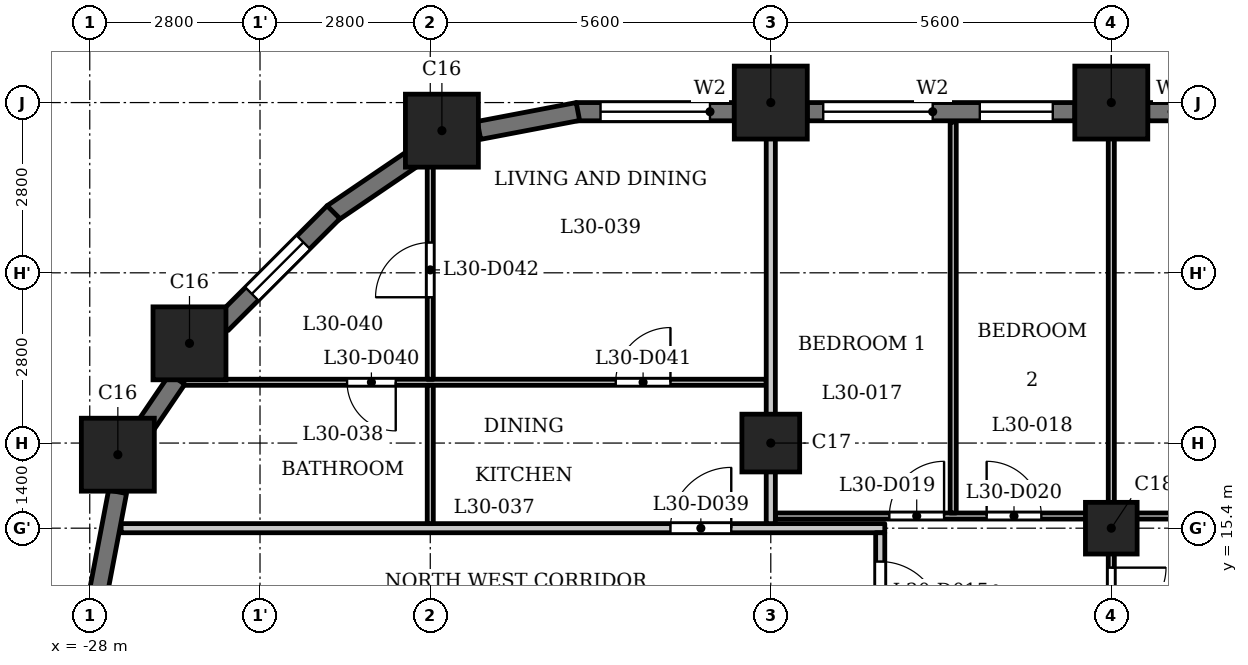
"""IFC4 building model, lengths in metres.
Left out: names, types, materials, properties, quantities, classifications, styles, units other than length and angle.
Written with IfcOpenShell. Run it as: python <this file> out.ifc"""

import sys

from ifc_helpers import new_model, si_unit, direction, frame, frame_2d, origin, origin_2d, place, context, subcontext, project, spatial, rectangle, extrude, element, fill, save


model = new_model("IFC4")
c1 = context("Model", 3, precision=1e-05, world=origin(), true_north=direction((0.0, 1.0)))
c2 = subcontext(c1, "Body", "Model", "MODEL_VIEW")
j1 = project(units=[si_unit("LENGTHUNIT", "METRE"), si_unit("PLANEANGLEUNIT", "RADIAN")], contexts=[c1])
p1 = place(None, origin())
s1 = spatial("IfcSite", under=j1, at=p1, CompositionType="ELEMENT")
p2 = place(p1, origin())
s2 = spatial("IfcBuilding", under=s1, at=p2, CompositionType="ELEMENT")
p3 = place(p2, frame((0.0, 0.0, 118.3)))
s3 = spatial("IfcBuildingStorey", under=s2, at=p3, CompositionType="ELEMENT", Elevation=118.3)
for number, where, z_axis, x_axis in (
    (1, (-11.2, 22.4, 0.0), (0.0, 0.0, 1.0), (1.0, 0.0, 0.0)),
    (2, (-16.8, 22.4, 0.0), (0.0, 0.0, 1.0), (1.0, 0.0, 0.0)),
    (3, (-22.209, 21.938, 0.0), (0.0, 0.0, 1.0), (1.0, 0.0, 0.0)),
    (4, (-26.36, 18.44, 0.0), (0.0, 0.0, 1.0), (1.0, 0.0, 0.0)),
    (5, (-27.538, 16.609, 0.0), (0.0, 0.0, 1.0), (1.0, 0.0, 0.0)),
):
    element("IfcColumn", number, at=place(p3, frame(where, z_axis=z_axis, x_axis=x_axis)), inside=s3, PredefinedType="COLUMN", context=c2, shape_type="SweptSolid", body=[
        extrude(rectangle(XDim=1.2, YDim=1.2, at=origin_2d()), origin(), (0.0, 0.0, 1.0), 3.5),
    ])
p4 = place(p3, frame((-16.8, 16.8, 0.0), z_axis=(0.0, 0.0, 1.0), x_axis=(1.0, 0.0, 0.0)))
e6 = element("IfcColumn", 6, at=p4, inside=s3, PredefinedType="COLUMN", context=c2, shape_type="SweptSolid", body=[
    extrude(rectangle(XDim=0.95, YDim=0.95, at=origin_2d()), origin(), (0.0, 0.0, 1.0), 3.5),
])
p5 = place(p3, frame((-11.2, 15.4, 0.0), z_axis=(0.0, 0.0, 1.0), x_axis=(1.0, 0.0, 0.0)))
e7 = element("IfcColumn", 7, at=p5, inside=s3, PredefinedType="COLUMN", context=c2, shape_type="SweptSolid", body=[
    extrude(rectangle(XDim=0.85, YDim=0.85, at=origin_2d()), origin(), (0.0, 0.0, 1.0), 3.5),
])
p6 = place(p3, frame((-6.2, 22.25, 0.0), z_axis=(0.0, 0.0, 1.0), x_axis=(-1.0, 0.0, 0.0)))
e8 = element("IfcWall", 8, at=p6, inside=s3, PredefinedType="SOLIDWALL", context=c2, shape_type="SweptSolid", body=[
    extrude(rectangle(XDim=4.4, YDim=0.3, at=frame_2d((2.2, 0.0))), origin(), (0.0, 0.0, 1.0), 2.4),
])
p7 = place(p6, frame((0.4, 0.0, 1.2)))
e9 = element("IfcOpeningElement", 9, at=p7, cuts=e8, PredefinedType="OPENING", context=c2, shape_type="SweptSolid", body=[
    extrude(rectangle(XDim=3.6, YDim=0.95, at=frame_2d((1.8, 0.475))), frame((0.0, 0.16, 0.0), z_axis=(0.0, -1.0, 0.0), x_axis=(1.0, 0.0, 0.0)), (0.0, 0.0, 1.0), 0.32),
])
p8 = place(p3, frame((-11.8, 22.25, 0.0), z_axis=(0.0, 0.0, 1.0), x_axis=(-1.0, 0.0, 0.0)))
e10 = element("IfcWall", 10, at=p8, inside=s3, PredefinedType="SOLIDWALL", context=c2, shape_type="SweptSolid", body=[
    extrude(rectangle(XDim=4.4, YDim=0.3, at=frame_2d((2.2, 0.0))), origin(), (0.0, 0.0, 1.0), 2.4),
])
p9 = place(p8, frame((0.363, 0.0, 0.6)))
e11 = element("IfcOpeningElement", 11, at=p9, cuts=e10, PredefinedType="OPENING", context=c2, shape_type="SweptSolid", body=[
    extrude(rectangle(XDim=1.2, YDim=1.55, at=frame_2d((0.6, 0.775))), frame((0.0, 0.16, 0.0), z_axis=(0.0, -1.0, 0.0), x_axis=(1.0, 0.0, 0.0)), (0.0, 0.0, 1.0), 0.32),
])
p10 = place(p8, frame((2.337, 0.0, 0.9)))
e12 = element("IfcOpeningElement", 12, at=p10, cuts=e10, PredefinedType="OPENING", context=c2, shape_type="SweptSolid", body=[
    extrude(rectangle(XDim=1.8, YDim=1.25, at=frame_2d((0.9, 0.625))), frame((0.0, 0.16, 0.0), z_axis=(0.0, -1.0, 0.0), x_axis=(1.0, 0.0, 0.0)), (0.0, 0.0, 1.0), 0.32),
])
p11 = place(p3, frame((-17.4, 22.25, 0.0), z_axis=(0.0, 0.0, 1.0), x_axis=(-1.0, 0.0, 0.0)))
e13 = element("IfcWall", 13, at=p11, inside=s3, PredefinedType="SOLIDWALL", context=c2, shape_type="SweptSolid", body=[
    extrude(rectangle(XDim=2.6, YDim=0.3, at=frame_2d((1.3, 0.0))), origin(), (0.0, 0.0, 1.0), 2.4),
])
p12 = place(p11, frame((0.4, 0.0, 0.9)))
e14 = element("IfcOpeningElement", 14, at=p12, cuts=e13, PredefinedType="OPENING", context=c2, shape_type="SweptSolid", body=[
    extrude(rectangle(XDim=1.8, YDim=1.25, at=frame_2d((0.9, 0.625))), frame((0.0, 0.16, 0.0), z_axis=(0.0, -1.0, 0.0), x_axis=(1.0, 0.0, 0.0)), (0.0, 0.0, 1.0), 0.32),
])
for number, where, z_axis, x_axis in (
    (15, (-19.972, 22.253, 0.0), (0.0, 0.0, 1.0), (-0.982, -0.187, 0.0)),
    (16, (-22.643, 21.51, 0.0), (0.0, 0.0, 1.0), (-0.827, -0.562, 0.0)),
):
    element("IfcWall", number, at=place(p3, frame(where, z_axis=z_axis, x_axis=x_axis)), inside=s3, PredefinedType="SOLIDWALL", context=c2, shape_type="SweptSolid", body=[
        extrude(rectangle(XDim=1.656, YDim=0.3, at=frame_2d((0.828, 0.0))), origin(), (0.0, 0.0, 1.0), 2.4),
    ])
p13 = place(p3, frame((-23.991, 20.597, 0.0), z_axis=(0.0, 0.0, 1.0), x_axis=(-0.707106781187, -0.707106781187, 0.0)))
e17 = element("IfcWall", 17, at=p13, inside=s3, PredefinedType="SOLIDWALL", context=c2, shape_type="SweptSolid", body=[
    extrude(rectangle(XDim=2.6, YDim=0.3, at=frame_2d((1.3, 0.0))), origin(), (0.0, 0.0, 1.0), 2.4),
])
p14 = place(p13, frame((0.7, 0.0, 0.6)))
e18 = element("IfcOpeningElement", 18, at=p14, cuts=e17, PredefinedType="OPENING", context=c2, shape_type="SweptSolid", body=[
    extrude(rectangle(XDim=1.2, YDim=1.55, at=frame_2d((0.6, 0.775))), frame((0.0, 0.16, 0.0), z_axis=(0.0, -1.0, 0.0), x_axis=(1.0, 0.0, 0.0)), (0.0, 0.0, 1.0), 0.32),
])
p15 = place(p3, frame((-26.561, 17.851, 0.0), z_axis=(0.0, 0.0, 1.0), x_axis=(-0.562173331661, -0.827019434577, 0.0)))
e19 = element("IfcWall", 19, at=p15, inside=s3, PredefinedType="SOLIDWALL", context=c2, shape_type="SweptSolid", body=[
    extrude(rectangle(XDim=0.977, YDim=0.3, at=frame_2d((0.489, 0.0))), origin(), (0.0, 0.0, 1.0), 3.2),
])
p16 = place(p3, frame((-27.542, 15.999, 0.0), z_axis=(0.0, 0.0, 1.0), x_axis=(-0.187349172861, -0.982293381546, 0.0)))
e20 = element("IfcWall", 20, at=p16, inside=s3, PredefinedType="SOLIDWALL", context=c2, shape_type="SweptSolid", body=[
    extrude(rectangle(XDim=1.656, YDim=0.3, at=frame_2d((0.828, 0.0))), origin(), (0.0, 0.0, 1.0), 2.4),
])
p17 = place(p3, frame((-27.484, 15.4, 0.0), z_axis=(0.0, 0.0, 1.0), x_axis=(1.0, 0.0, 0.0)))
e21 = element("IfcWall", 21, at=p17, inside=s3, PredefinedType="PARTITIONING", context=c2, shape_type="SweptSolid", body=[
    extrude(rectangle(XDim=12.559, YDim=0.15, at=frame_2d((6.279, 0.0))), origin(), (0.0, 0.0, 1.0), 3.2),
])
p18 = place(p17, frame((9.034, 0.0, 0.0)))
e22 = element("IfcOpeningElement", 22, at=p18, cuts=e21, PredefinedType="OPENING", context=c2, shape_type="SweptSolid", body=[
    extrude(rectangle(XDim=1.0, YDim=2.1, at=frame_2d((0.5, 1.05))), frame((0.0, 0.085, 0.0), z_axis=(0.0, -1.0, 0.0), x_axis=(1.0, 0.0, 0.0)), (0.0, 0.0, 1.0), 0.17),
])
p19 = place(p3, frame((-16.725, 15.6, 0.0), z_axis=(0.0, 0.0, 1.0), x_axis=(1.0, 0.0, 0.0)))
e23 = element("IfcWall", 23, at=p19, inside=s3, PredefinedType="PARTITIONING", context=c2, shape_type="SweptSolid", body=[
    extrude(rectangle(XDim=33.45, YDim=0.1, at=frame_2d((16.725, 0.0))), origin(), (0.0, 0.0, 1.0), 3.2),
])
p20 = place(p19, frame((9.425, 0.0, 0.0)))
e24 = element("IfcOpeningElement", 24, at=p20, cuts=e23, PredefinedType="OPENING", context=c2, shape_type="SweptSolid", body=[
    extrude(rectangle(XDim=0.8, YDim=2.1, at=frame_2d((0.4, 1.05))), frame((0.0, 0.06, 0.0), z_axis=(0.0, -1.0, 0.0), x_axis=(1.0, 0.0, 0.0)), (0.0, 0.0, 1.0), 0.12),
])
p21 = place(p19, frame((6.975, 0.0, 0.0)))
e25 = element("IfcOpeningElement", 25, at=p21, cuts=e23, PredefinedType="OPENING", context=c2, shape_type="SweptSolid", body=[
    extrude(rectangle(XDim=0.9, YDim=2.1, at=frame_2d((0.45, 1.05))), frame((0.0, 0.06, 0.0), z_axis=(0.0, -1.0, 0.0), x_axis=(1.0, 0.0, 0.0)), (0.0, 0.0, 1.0), 0.12),
])
p22 = place(p19, frame((1.875, 0.0, 0.0)))
e26 = element("IfcOpeningElement", 26, at=p22, cuts=e23, PredefinedType="OPENING", context=c2, shape_type="SweptSolid", body=[
    extrude(rectangle(XDim=0.9, YDim=2.1, at=frame_2d((0.45, 1.05))), frame((0.0, 0.06, 0.0), z_axis=(0.0, -1.0, 0.0), x_axis=(1.0, 0.0, 0.0)), (0.0, 0.0, 1.0), 0.12),
])
p23 = place(p19, frame((3.475, 0.0, 0.0)))
e27 = element("IfcOpeningElement", 27, at=p23, cuts=e23, PredefinedType="OPENING", context=c2, shape_type="SweptSolid", body=[
    extrude(rectangle(XDim=0.9, YDim=2.1, at=frame_2d((0.45, 1.05))), frame((0.0, 0.06, 0.0), z_axis=(0.0, -1.0, 0.0), x_axis=(1.0, 0.0, 0.0)), (0.0, 0.0, 1.0), 0.12),
])
p24 = place(p19, frame((11.775, 0.0, 0.0)))
e28 = element("IfcOpeningElement", 28, at=p24, cuts=e23, PredefinedType="OPENING", context=c2, shape_type="SweptSolid", body=[
    extrude(rectangle(XDim=0.8, YDim=2.1, at=frame_2d((0.4, 1.05))), frame((0.0, 0.06, 0.0), z_axis=(0.0, -1.0, 0.0), x_axis=(1.0, 0.0, 0.0)), (0.0, 0.0, 1.0), 0.12),
])
p25 = place(p19, frame((14.175, 0.0, 0.0)))
e29 = element("IfcOpeningElement", 29, at=p25, cuts=e23, PredefinedType="OPENING", context=c2, shape_type="SweptSolid", body=[
    extrude(rectangle(XDim=0.9, YDim=2.1, at=frame_2d((0.45, 1.05))), frame((0.0, 0.06, 0.0), z_axis=(0.0, -1.0, 0.0), x_axis=(1.0, 0.0, 0.0)), (0.0, 0.0, 1.0), 0.12),
])
p26 = place(p19, frame((20.725, 0.0, 0.0)))
e30 = element("IfcOpeningElement", 30, at=p26, cuts=e23, PredefinedType="OPENING", context=c2, shape_type="SweptSolid", body=[
    extrude(rectangle(XDim=0.8, YDim=2.1, at=frame_2d((0.4, 1.05))), frame((0.0, 0.06, 0.0), z_axis=(0.0, -1.0, 0.0), x_axis=(1.0, 0.0, 0.0)), (0.0, 0.0, 1.0), 0.12),
])
p27 = place(p19, frame((18.375, 0.0, 0.0)))
e31 = element("IfcOpeningElement", 31, at=p27, cuts=e23, PredefinedType="OPENING", context=c2, shape_type="SweptSolid", body=[
    extrude(rectangle(XDim=0.9, YDim=2.1, at=frame_2d((0.45, 1.05))), frame((0.0, 0.06, 0.0), z_axis=(0.0, -1.0, 0.0), x_axis=(1.0, 0.0, 0.0)), (0.0, 0.0, 1.0), 0.12),
])
p28 = place(p19, frame((26.425, 0.0, 0.0)))
e32 = element("IfcOpeningElement", 32, at=p28, cuts=e23, PredefinedType="OPENING", context=c2, shape_type="SweptSolid", body=[
    extrude(rectangle(XDim=0.8, YDim=2.1, at=frame_2d((0.4, 1.05))), frame((0.0, 0.06, 0.0), z_axis=(0.0, -1.0, 0.0), x_axis=(1.0, 0.0, 0.0)), (0.0, 0.0, 1.0), 0.12),
])
p29 = place(p19, frame((23.875, 0.0, 0.0)))
e33 = element("IfcOpeningElement", 33, at=p29, cuts=e23, PredefinedType="OPENING", context=c2, shape_type="SweptSolid", body=[
    extrude(rectangle(XDim=0.9, YDim=2.1, at=frame_2d((0.45, 1.05))), frame((0.0, 0.06, 0.0), z_axis=(0.0, -1.0, 0.0), x_axis=(1.0, 0.0, 0.0)), (0.0, 0.0, 1.0), 0.12),
])
p30 = place(p19, frame((28.575, 0.0, 0.0)))
e34 = element("IfcOpeningElement", 34, at=p30, cuts=e23, PredefinedType="OPENING", context=c2, shape_type="SweptSolid", body=[
    extrude(rectangle(XDim=0.8, YDim=2.1, at=frame_2d((0.4, 1.05))), frame((0.0, 0.06, 0.0), z_axis=(0.0, -1.0, 0.0), x_axis=(1.0, 0.0, 0.0)), (0.0, 0.0, 1.0), 0.12),
])
p31 = place(p19, frame((30.725, 0.0, 0.0)))
e35 = element("IfcOpeningElement", 35, at=p31, cuts=e23, PredefinedType="OPENING", context=c2, shape_type="SweptSolid", body=[
    extrude(rectangle(XDim=0.9, YDim=2.1, at=frame_2d((0.45, 1.05))), frame((0.0, 0.06, 0.0), z_axis=(0.0, -1.0, 0.0), x_axis=(1.0, 0.0, 0.0)), (0.0, 0.0, 1.0), 0.12),
])
p32 = place(p3, frame((-26.465, 17.8, 0.0), z_axis=(0.0, 0.0, 1.0), x_axis=(1.0, 0.0, 0.0)))
e36 = element("IfcWall", 36, at=p32, inside=s3, PredefinedType="PARTITIONING", context=c2, shape_type="SweptSolid", body=[
    extrude(rectangle(XDim=9.59, YDim=0.1, at=frame_2d((4.795, 0.0))), origin(), (0.0, 0.0, 1.0), 3.2),
])
p33 = place(p32, frame((2.697, 0.0, 0.0)))
e37 = element("IfcOpeningElement", 37, at=p33, cuts=e36, PredefinedType="OPENING", context=c2, shape_type="SweptSolid", body=[
    extrude(rectangle(XDim=0.8, YDim=2.1, at=frame_2d((0.4, 1.05))), frame((0.0, 0.06, 0.0), z_axis=(0.0, -1.0, 0.0), x_axis=(1.0, 0.0, 0.0)), (0.0, 0.0, 1.0), 0.12),
])
p34 = place(p32, frame((7.115, 0.0, 0.0)))
e38 = element("IfcOpeningElement", 38, at=p34, cuts=e36, PredefinedType="OPENING", context=c2, shape_type="SweptSolid", body=[
    extrude(rectangle(XDim=0.9, YDim=2.1, at=frame_2d((0.45, 1.05))), frame((0.0, 0.06, 0.0), z_axis=(0.0, -1.0, 0.0), x_axis=(1.0, 0.0, 0.0)), (0.0, 0.0, 1.0), 0.12),
])
p35 = place(p3, frame((-22.4, 15.475, 0.0), z_axis=(0.0, 0.0, 1.0), x_axis=(0.0, 1.0, 0.0)))
e39 = element("IfcWall", 39, at=p35, inside=s3, PredefinedType="PARTITIONING", context=c2, shape_type="SweptSolid", body=[
    extrude(rectangle(XDim=2.275, YDim=0.1, at=frame_2d((1.137, 0.0))), origin(), (0.0, 0.0, 1.0), 3.2),
])
p36 = place(p3, frame((-22.4, 17.85, 0.0), z_axis=(0.0, 0.0, 1.0), x_axis=(0.0, 1.0, 0.0)))
e40 = element("IfcWall", 40, at=p36, inside=s3, PredefinedType="PARTITIONING", context=c2, shape_type="SweptSolid", body=[
    extrude(rectangle(XDim=3.87, YDim=0.1, at=frame_2d((1.935, 0.0))), origin(), (0.0, 0.0, 1.0), 3.2),
])
p37 = place(p36, frame((1.348, 0.0, 0.0)))
e41 = element("IfcOpeningElement", 41, at=p37, cuts=e40, PredefinedType="OPENING", context=c2, shape_type="SweptSolid", body=[
    extrude(rectangle(XDim=0.9, YDim=2.1, at=frame_2d((0.45, 1.05))), frame((0.0, 0.06, 0.0), z_axis=(0.0, -1.0, 0.0), x_axis=(1.0, 0.0, 0.0)), (0.0, 0.0, 1.0), 0.12),
])
p38 = place(p3, frame((-16.8, 15.475, 0.0), z_axis=(0.0, 0.0, 1.0), x_axis=(0.0, 1.0, 0.0)))
e42 = element("IfcWall", 42, at=p38, inside=s3, PredefinedType="PARTITIONING", context=c2, shape_type="SweptSolid", body=[
    extrude(rectangle(XDim=7.505, YDim=0.15, at=frame_2d((3.752, 0.0))), origin(), (0.0, 0.0, 1.0), 3.2),
])
p39 = place(p3, frame((-15.0, 13.275, 0.0), z_axis=(0.0, 0.0, 1.0), x_axis=(0.0, 1.0, 0.0)))
e43 = element("IfcWall", 43, at=p39, inside=s3, PredefinedType="PARTITIONING", context=c2, shape_type="SweptSolid", body=[
    extrude(rectangle(XDim=2.05, YDim=0.15, at=frame_2d((1.025, 0.0))), origin(), (0.0, 0.0, 1.0), 3.2),
])
p40 = place(p39, frame((0.576, 0.0, 0.0)))
e44 = element("IfcOpeningElement", 44, at=p40, cuts=e43, PredefinedType="OPENING", context=c2, shape_type="SweptSolid", body=[
    extrude(rectangle(XDim=1.0, YDim=2.1, at=frame_2d((0.5, 1.05))), frame((0.0, 0.085, 0.0), z_axis=(0.0, -1.0, 0.0), x_axis=(1.0, 0.0, 0.0)), (0.0, 0.0, 1.0), 0.17),
])
p41 = place(p3, frame((-13.8, 15.65, 0.0), z_axis=(0.0, 0.0, 1.0), x_axis=(0.0, 1.0, 0.0)))
e45 = element("IfcWall", 45, at=p41, inside=s3, PredefinedType="PARTITIONING", context=c2, shape_type="SweptSolid", body=[
    extrude(rectangle(XDim=6.43, YDim=0.1, at=frame_2d((3.215, 0.0))), origin(), (0.0, 0.0, 1.0), 3.2),
])
p42 = place(p3, frame((-11.2, 13.275, 0.0), z_axis=(0.0, 0.0, 1.0), x_axis=(0.0, 1.0, 0.0)))
e46 = element("IfcWall", 46, at=p42, inside=s3, PredefinedType="PARTITIONING", context=c2, shape_type="SweptSolid", body=[
    extrude(rectangle(XDim=2.275, YDim=0.1, at=frame_2d((1.138, 0.0))), origin(), (0.0, 0.0, 1.0), 3.2),
])
p43 = place(p42, frame((0.576, 0.0, 0.0)))
e47 = element("IfcOpeningElement", 47, at=p43, cuts=e46, PredefinedType="OPENING", context=c2, shape_type="SweptSolid", body=[
    extrude(rectangle(XDim=0.9, YDim=2.1, at=frame_2d((0.45, 1.05))), frame((0.0, 0.06, 0.0), z_axis=(0.0, -1.0, 0.0), x_axis=(1.0, 0.0, 0.0)), (0.0, 0.0, 1.0), 0.12),
])
p44 = place(p3, frame((-11.2, 15.65, 0.0), z_axis=(0.0, 0.0, 1.0), x_axis=(0.0, 1.0, 0.0)))
e48 = element("IfcWall", 48, at=p44, inside=s3, PredefinedType="PARTITIONING", context=c2, shape_type="SweptSolid", body=[
    extrude(rectangle(XDim=7.33, YDim=0.1, at=frame_2d((3.665, 0.0))), origin(), (0.0, 0.0, 1.0), 3.2),
])
p45 = place(p40, origin())
e49 = element("IfcDoor", 49, at=p45, inside=s3, OperationType="SINGLE_SWING_LEFT", PredefinedType="DOOR", context=c2, shape_type="SweptSolid", body=[
    extrude(rectangle(XDim=1.0, YDim=2.1, at=frame_2d((0.5, 1.05))), frame((0.0, 0.025, 0.0), z_axis=(0.0, -1.0, 0.0), x_axis=(1.0, 0.0, 0.0)), (0.0, 0.0, 1.0), 0.05),
])
fill(e44, e49)
p46 = place(p43, origin())
e50 = element("IfcDoor", 50, at=p46, inside=s3, OperationType="SINGLE_SWING_RIGHT", PredefinedType="DOOR", context=c2, shape_type="SweptSolid", body=[
    extrude(rectangle(XDim=0.9, YDim=2.1, at=frame_2d((0.45, 1.05))), frame((0.0, 0.025, 0.0), z_axis=(0.0, -1.0, 0.0), x_axis=(1.0, 0.0, 0.0)), (0.0, 0.0, 1.0), 0.05),
])
fill(e47, e50)
p47 = place(p22, origin())
e51 = element("IfcDoor", 51, at=p47, inside=s3, OperationType="SINGLE_SWING_LEFT", PredefinedType="DOOR", context=c2, shape_type="SweptSolid", body=[
    extrude(rectangle(XDim=0.9, YDim=2.1, at=frame_2d((0.45, 1.05))), frame((0.0, 0.025, 0.0), z_axis=(0.0, -1.0, 0.0), x_axis=(1.0, 0.0, 0.0)), (0.0, 0.0, 1.0), 0.05),
])
fill(e26, e51)
p48 = place(p23, origin())
e52 = element("IfcDoor", 52, at=p48, inside=s3, OperationType="SINGLE_SWING_RIGHT", PredefinedType="DOOR", context=c2, shape_type="SweptSolid", body=[
    extrude(rectangle(XDim=0.9, YDim=2.1, at=frame_2d((0.45, 1.05))), frame((0.0, 0.025, 0.0), z_axis=(0.0, -1.0, 0.0), x_axis=(1.0, 0.0, 0.0)), (0.0, 0.0, 1.0), 0.05),
])
fill(e27, e52)
p49 = place(p18, origin())
e53 = element("IfcDoor", 53, at=p49, inside=s3, OperationType="SINGLE_SWING_LEFT", PredefinedType="DOOR", context=c2, shape_type="SweptSolid", body=[
    extrude(rectangle(XDim=1.0, YDim=2.1, at=frame_2d((0.5, 1.05))), frame((0.0, 0.025, 0.0), z_axis=(0.0, -1.0, 0.0), x_axis=(1.0, 0.0, 0.0)), (0.0, 0.0, 1.0), 0.05),
])
fill(e22, e53)
p50 = place(p33, origin())
e54 = element("IfcDoor", 54, at=p50, inside=s3, OperationType="SINGLE_SWING_RIGHT", PredefinedType="DOOR", context=c2, shape_type="SweptSolid", body=[
    extrude(rectangle(XDim=0.8, YDim=2.1, at=frame_2d((0.4, 1.05))), frame((0.0, 0.025, 0.0), z_axis=(0.0, -1.0, 0.0), x_axis=(1.0, 0.0, 0.0)), (0.0, 0.0, 1.0), 0.05),
])
fill(e37, e54)
p51 = place(p34, origin())
e55 = element("IfcDoor", 55, at=p51, inside=s3, OperationType="SINGLE_SWING_LEFT", PredefinedType="DOOR", context=c2, shape_type="SweptSolid", body=[
    extrude(rectangle(XDim=0.9, YDim=2.1, at=frame_2d((0.45, 1.05))), frame((0.0, 0.025, 0.0), z_axis=(0.0, -1.0, 0.0), x_axis=(1.0, 0.0, 0.0)), (0.0, 0.0, 1.0), 0.05),
])
fill(e38, e55)
p52 = place(p37, origin())
e56 = element("IfcDoor", 56, at=p52, inside=s3, OperationType="SINGLE_SWING_RIGHT", PredefinedType="DOOR", context=c2, shape_type="SweptSolid", body=[
    extrude(rectangle(XDim=0.9, YDim=2.1, at=frame_2d((0.45, 1.05))), frame((0.0, 0.025, 0.0), z_axis=(0.0, -1.0, 0.0), x_axis=(1.0, 0.0, 0.0)), (0.0, 0.0, 1.0), 0.05),
])
fill(e41, e56)
p53 = place(p9, origin())
e57 = element("IfcWindow", 57, at=p53, inside=s3, PartitioningType="SINGLE_PANEL", PredefinedType="WINDOW", context=c2, shape_type="SweptSolid", body=[
    extrude(rectangle(XDim=1.2, YDim=1.55, at=frame_2d((0.6, 0.775))), frame((0.0, 0.03, 0.0), z_axis=(0.0, -1.0, 0.0), x_axis=(1.0, 0.0, 0.0)), (0.0, 0.0, 1.0), 0.06),
])
fill(e11, e57)
p54 = place(p10, origin())
e58 = element("IfcWindow", 58, at=p54, inside=s3, PartitioningType="SINGLE_PANEL", PredefinedType="WINDOW", context=c2, shape_type="SweptSolid", body=[
    extrude(rectangle(XDim=1.8, YDim=1.25, at=frame_2d((0.9, 0.625))), frame((0.0, 0.03, 0.0), z_axis=(0.0, -1.0, 0.0), x_axis=(1.0, 0.0, 0.0)), (0.0, 0.0, 1.0), 0.06),
])
fill(e12, e58)
p55 = place(p12, origin())
e59 = element("IfcWindow", 59, at=p55, inside=s3, PartitioningType="SINGLE_PANEL", PredefinedType="WINDOW", context=c2, shape_type="SweptSolid", body=[
    extrude(rectangle(XDim=1.8, YDim=1.25, at=frame_2d((0.9, 0.625))), frame((0.0, 0.03, 0.0), z_axis=(0.0, -1.0, 0.0), x_axis=(1.0, 0.0, 0.0)), (0.0, 0.0, 1.0), 0.06),
])
fill(e14, e59)
p56 = place(p14, origin())
e60 = element("IfcWindow", 60, at=p56, inside=s3, PartitioningType="SINGLE_PANEL", PredefinedType="WINDOW", context=c2, shape_type="SweptSolid", body=[
    extrude(rectangle(XDim=1.2, YDim=1.55, at=frame_2d((0.6, 0.775))), frame((0.0, 0.03, 0.0), z_axis=(0.0, -1.0, 0.0), x_axis=(1.0, 0.0, 0.0)), (0.0, 0.0, 1.0), 0.06),
])
fill(e18, e60)
save(model, sys.argv[1])
